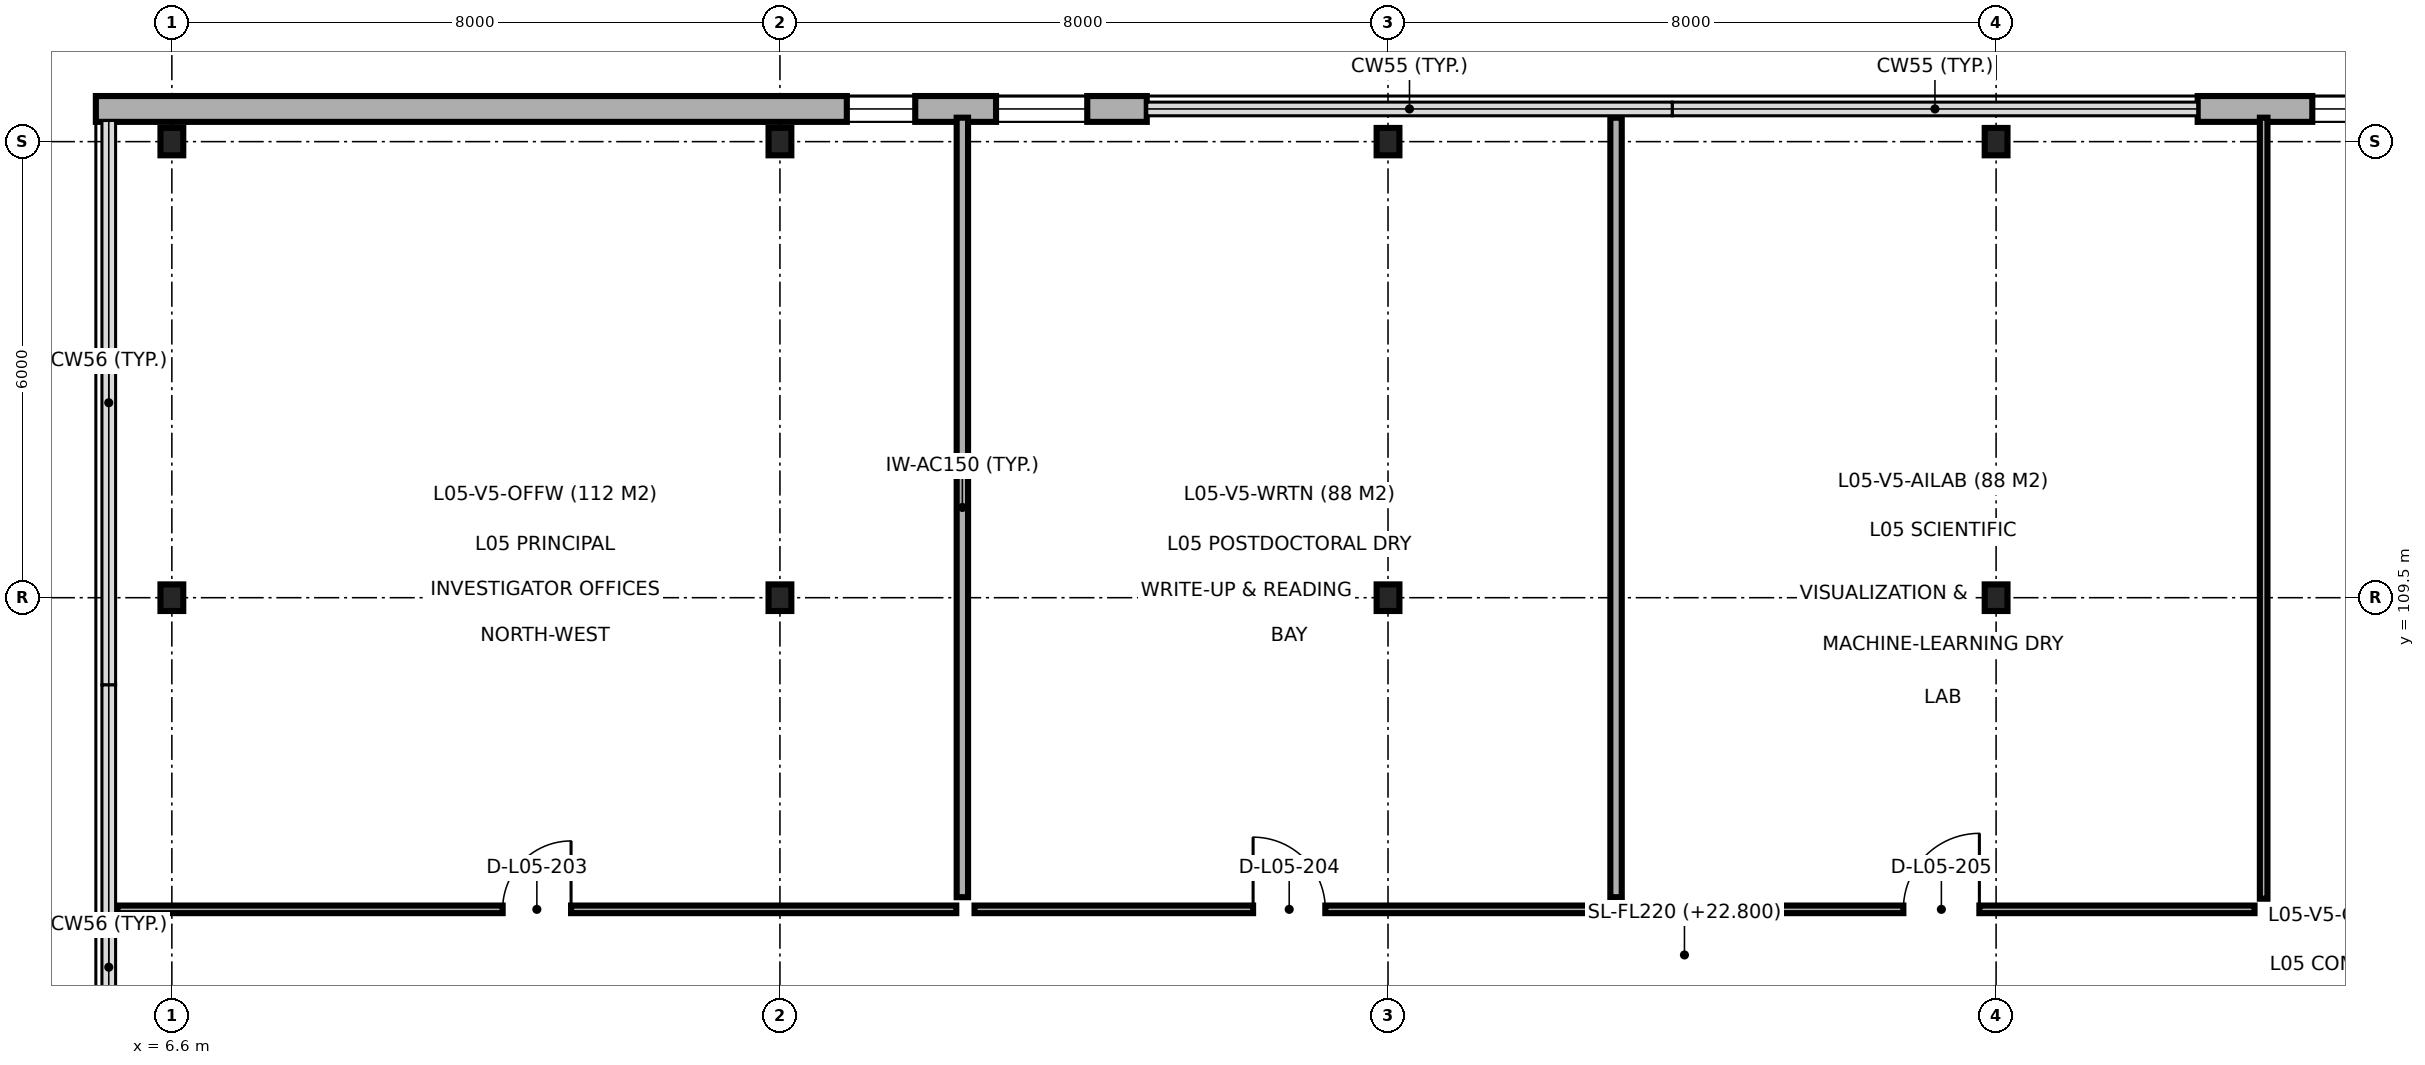
"""IFC4 building model, lengths in metres.
Left out: names, types, materials, properties, quantities, classifications, styles, units other than length and angle.
Written with IfcOpenShell. Run it as: python <this file> out.ifc"""

import sys

from ifc_helpers import new_model, si_unit, direction, frame, frame_2d, origin, origin_2d, place, context, subcontext, project, spatial, rectangle, i_section, extrude, element, fill, save


model = new_model("IFC4")
c1 = context("Model", 3, precision=1e-05, world=origin(), true_north=direction((0.0, 1.0)))
c2 = subcontext(c1, "Body", "Model", "MODEL_VIEW")
j1 = project(units=[si_unit("LENGTHUNIT", "METRE"), si_unit("PLANEANGLEUNIT", "RADIAN")], contexts=[c1])
p1 = place(None, origin())
s1 = spatial("IfcSite", under=j1, at=p1, CompositionType="ELEMENT")
p2 = place(p1, origin())
s2 = spatial("IfcBuilding", under=s1, at=p2, CompositionType="ELEMENT")
p3 = place(p2, frame((0.0, 0.0, 22.8)))
s3 = spatial("IfcBuildingStorey", under=s2, at=p3, CompositionType="ELEMENT", Elevation=22.8)
p4 = place(p3, frame((6.6, 109.5, 0.0), z_axis=(0.0, 0.0, 1.0), x_axis=(1.0, 0.0, 0.0)))
e1 = element("IfcColumn", 1, at=p4, inside=s3, PredefinedType="COLUMN", context=c2, shape_type="SweptSolid", body=[
    extrude(i_section(OverallWidth=0.3, OverallDepth=0.35, WebThickness=0.01, FlangeThickness=0.018, FilletRadius=0.027, at=origin_2d()), origin(), (0.0, 0.0, 1.0), 3.9),
])
p5 = place(p3, frame((6.6, 115.5, 0.0), z_axis=(0.0, 0.0, 1.0), x_axis=(1.0, 0.0, 0.0)))
e2 = element("IfcColumn", 2, at=p5, inside=s3, PredefinedType="COLUMN", context=c2, shape_type="SweptSolid", body=[
    extrude(i_section(OverallWidth=0.3, OverallDepth=0.36, WebThickness=0.012, FlangeThickness=0.022, FilletRadius=0.027, at=origin_2d()), origin(), (0.0, 0.0, 1.0), 3.9),
])
p6 = place(p3, frame((14.6, 109.5, 0.0), z_axis=(0.0, 0.0, 1.0), x_axis=(1.0, 0.0, 0.0)))
e3 = element("IfcColumn", 3, at=p6, inside=s3, PredefinedType="COLUMN", context=c2, shape_type="SweptSolid", body=[
    extrude(i_section(OverallWidth=0.3, OverallDepth=0.35, WebThickness=0.01, FlangeThickness=0.018, FilletRadius=0.027, at=origin_2d()), origin(), (0.0, 0.0, 1.0), 3.9),
])
p7 = place(p3, frame((14.6, 115.5, 0.0), z_axis=(0.0, 0.0, 1.0), x_axis=(1.0, 0.0, 0.0)))
e4 = element("IfcColumn", 4, at=p7, inside=s3, PredefinedType="COLUMN", context=c2, shape_type="SweptSolid", body=[
    extrude(i_section(OverallWidth=0.3, OverallDepth=0.36, WebThickness=0.012, FlangeThickness=0.022, FilletRadius=0.027, at=origin_2d()), origin(), (0.0, 0.0, 1.0), 3.9),
])
p8 = place(p3, frame((22.6, 109.5, 0.0), z_axis=(0.0, 0.0, 1.0), x_axis=(1.0, 0.0, 0.0)))
e5 = element("IfcColumn", 5, at=p8, inside=s3, PredefinedType="COLUMN", context=c2, shape_type="SweptSolid", body=[
    extrude(i_section(OverallWidth=0.3, OverallDepth=0.35, WebThickness=0.01, FlangeThickness=0.018, FilletRadius=0.027, at=origin_2d()), origin(), (0.0, 0.0, 1.0), 3.9),
])
p9 = place(p3, frame((22.6, 115.5, 0.0), z_axis=(0.0, 0.0, 1.0), x_axis=(1.0, 0.0, 0.0)))
e6 = element("IfcColumn", 6, at=p9, inside=s3, PredefinedType="COLUMN", context=c2, shape_type="SweptSolid", body=[
    extrude(i_section(OverallWidth=0.3, OverallDepth=0.36, WebThickness=0.012, FlangeThickness=0.022, FilletRadius=0.027, at=origin_2d()), origin(), (0.0, 0.0, 1.0), 3.9),
])
p10 = place(p3, frame((30.6, 109.5, 0.0), z_axis=(0.0, 0.0, 1.0), x_axis=(1.0, 0.0, 0.0)))
e7 = element("IfcColumn", 7, at=p10, inside=s3, PredefinedType="COLUMN", context=c2, shape_type="SweptSolid", body=[
    extrude(i_section(OverallWidth=0.3, OverallDepth=0.35, WebThickness=0.01, FlangeThickness=0.018, FilletRadius=0.027, at=origin_2d()), origin(), (0.0, 0.0, 1.0), 3.9),
])
p11 = place(p3, frame((30.6, 115.5, 0.0), z_axis=(0.0, 0.0, 1.0), x_axis=(1.0, 0.0, 0.0)))
e8 = element("IfcColumn", 8, at=p11, inside=s3, PredefinedType="COLUMN", context=c2, shape_type="SweptSolid", body=[
    extrude(i_section(OverallWidth=0.3, OverallDepth=0.36, WebThickness=0.012, FlangeThickness=0.022, FilletRadius=0.027, at=origin_2d()), origin(), (0.0, 0.0, 1.0), 3.9),
])
p12 = place(p3, frame((47.078, 115.93, 0.0), z_axis=(0.0, 0.0, 1.0), x_axis=(-1.0, 0.0, 0.0)))
e9 = element("IfcWall", 9, at=p12, inside=s3, PredefinedType="SOLIDWALL", context=c2, shape_type="SweptSolid", body=[
    extrude(rectangle(XDim=13.826, YDim=0.34, at=frame_2d((6.913, 0.0))), origin(), (0.0, 0.0, 1.0), 3.68),
])
p13 = place(p12, frame((9.158, 0.0, 0.9)))
e10 = element("IfcOpeningElement", 10, at=p13, cuts=e9, PredefinedType="OPENING", context=c2, shape_type="SweptSolid", body=[
    extrude(rectangle(XDim=0.9, YDim=1.8, at=frame_2d((0.45, 0.9))), frame((0.0, 0.18, 0.0), z_axis=(0.0, -1.0, 0.0), x_axis=(1.0, 0.0, 0.0)), (0.0, 0.0, 1.0), 0.36),
])
p14 = place(p12, frame((11.118, 0.0, 0.9)))
e11 = element("IfcOpeningElement", 11, at=p14, cuts=e9, PredefinedType="OPENING", context=c2, shape_type="SweptSolid", body=[
    extrude(rectangle(XDim=1.2, YDim=1.8, at=frame_2d((0.6, 0.9))), frame((0.0, 0.18, 0.0), z_axis=(0.0, -1.0, 0.0), x_axis=(1.0, 0.0, 0.0)), (0.0, 0.0, 1.0), 0.36),
])
p15 = place(p3, frame((19.426, 115.93, 0.0), z_axis=(0.0, 0.0, 1.0), x_axis=(-1.0, 0.0, 0.0)))
e12 = element("IfcWall", 12, at=p15, inside=s3, PredefinedType="SOLIDWALL", context=c2, shape_type="SweptSolid", body=[
    extrude(rectangle(XDim=13.826, YDim=0.34, at=frame_2d((6.913, 0.0))), origin(), (0.0, 0.0, 1.0), 3.68),
])
p16 = place(p15, frame((0.783, 0.0, 0.9)))
e13 = element("IfcOpeningElement", 13, at=p16, cuts=e12, PredefinedType="OPENING", context=c2, shape_type="SweptSolid", body=[
    extrude(rectangle(XDim=1.2, YDim=1.8, at=frame_2d((0.6, 0.9))), frame((0.0, 0.18, 0.0), z_axis=(0.0, -1.0, 0.0), x_axis=(1.0, 0.0, 0.0)), (0.0, 0.0, 1.0), 0.36),
])
p17 = place(p15, frame((3.046, 0.0, 0.9)))
e14 = element("IfcOpeningElement", 14, at=p17, cuts=e12, PredefinedType="OPENING", context=c2, shape_type="SweptSolid", body=[
    extrude(rectangle(XDim=0.9, YDim=1.8, at=frame_2d((0.45, 0.9))), frame((0.0, 0.18, 0.0), z_axis=(0.0, -1.0, 0.0), x_axis=(1.0, 0.0, 0.0)), (0.0, 0.0, 1.0), 0.36),
])
p18 = place(p3, frame((17.0, 105.56, 0.0), z_axis=(0.0, 0.0, 1.0), x_axis=(0.0, 1.0, 0.0)))
e15 = element("IfcWall", 15, at=p18, inside=s3, PredefinedType="PARTITIONING", context=c2, shape_type="SweptSolid", body=[
    extrude(rectangle(XDim=10.255, YDim=0.15, at=frame_2d((5.127, 0.0))), origin(), (0.0, 0.0, 1.0), 3.44),
])
p19 = place(p3, frame((25.6, 105.56, 0.0), z_axis=(0.0, 0.0, 1.0), x_axis=(0.0, 1.0, 0.0)))
e16 = element("IfcWall", 16, at=p19, inside=s3, PredefinedType="PARTITIONING", context=c2, shape_type="SweptSolid", body=[
    extrude(rectangle(XDim=10.255, YDim=0.15, at=frame_2d((5.127, 0.0))), origin(), (0.0, 0.0, 1.0), 3.38),
])
p20 = place(p3, frame((34.12, 105.54, 0.0), z_axis=(0.0, 0.0, 1.0), x_axis=(0.0, 1.0, 0.0)))
e17 = element("IfcWall", 17, at=p20, inside=s3, PredefinedType="PARTITIONING", context=c2, shape_type="SweptSolid", body=[
    extrude(rectangle(XDim=10.275, YDim=0.1, at=frame_2d((5.137, 0.0))), origin(), (0.0, 0.0, 1.0), 3.68),
])
p21 = place(p3, frame((5.885, 105.4, 0.0), z_axis=(0.0, 0.0, 1.0), x_axis=(1.0, 0.0, 0.0)))
e18 = element("IfcWall", 18, at=p21, inside=s3, PredefinedType="PARTITIONING", context=c2, shape_type="SweptSolid", body=[
    extrude(rectangle(XDim=11.035, YDim=0.1, at=frame_2d((5.518, 0.0))), origin(), (0.0, 0.0, 1.0), 3.68),
])
p22 = place(p21, frame((5.067, 0.0, 0.0)))
e19 = element("IfcOpeningElement", 19, at=p22, cuts=e18, PredefinedType="OPENING", context=c2, shape_type="SweptSolid", body=[
    extrude(rectangle(XDim=0.9, YDim=2.1, at=frame_2d((0.45, 1.05))), frame((0.0, 0.06, 0.0), z_axis=(0.0, -1.0, 0.0), x_axis=(1.0, 0.0, 0.0)), (0.0, 0.0, 1.0), 0.12),
])
p23 = place(p3, frame((17.16, 105.4, 0.0), z_axis=(0.0, 0.0, 1.0), x_axis=(1.0, 0.0, 0.0)))
e20 = element("IfcWall", 20, at=p23, inside=s3, PredefinedType="PARTITIONING", context=c2, shape_type="SweptSolid", body=[
    extrude(rectangle(XDim=8.28, YDim=0.1, at=frame_2d((4.14, 0.0))), origin(), (0.0, 0.0, 1.0), 3.68),
])
p24 = place(p23, frame((3.665, 0.0, 0.0)))
e21 = element("IfcOpeningElement", 21, at=p24, cuts=e20, PredefinedType="OPENING", context=c2, shape_type="SweptSolid", body=[
    extrude(rectangle(XDim=0.95, YDim=2.1, at=frame_2d((0.475, 1.05))), frame((0.0, 0.06, 0.0), z_axis=(0.0, -1.0, 0.0), x_axis=(1.0, 0.0, 0.0)), (0.0, 0.0, 1.0), 0.12),
])
p25 = place(p3, frame((25.76, 105.4, 0.0), z_axis=(0.0, 0.0, 1.0), x_axis=(1.0, 0.0, 0.0)))
e22 = element("IfcWall", 22, at=p25, inside=s3, PredefinedType="PARTITIONING", context=c2, shape_type="SweptSolid", body=[
    extrude(rectangle(XDim=8.24, YDim=0.1, at=frame_2d((4.12, 0.0))), origin(), (0.0, 0.0, 1.0), 3.68),
])
p26 = place(p25, frame((3.62, 0.0, 0.0)))
e23 = element("IfcOpeningElement", 23, at=p26, cuts=e22, PredefinedType="OPENING", context=c2, shape_type="SweptSolid", body=[
    extrude(rectangle(XDim=1.0, YDim=2.15, at=frame_2d((0.5, 1.075))), frame((0.0, 0.06, 0.0), z_axis=(0.0, -1.0, 0.0), x_axis=(1.0, 0.0, 0.0)), (0.0, 0.0, 1.0), 0.12),
])
p27 = place(p14, origin())
e24 = element("IfcWindow", 24, at=p27, inside=s3, PartitioningType="SINGLE_PANEL", PredefinedType="WINDOW", context=c2, shape_type="SweptSolid", body=[
    extrude(rectangle(XDim=1.2, YDim=1.8, at=frame_2d((0.6, 0.9))), frame((0.0, 0.03, 0.0), z_axis=(0.0, -1.0, 0.0), x_axis=(1.0, 0.0, 0.0)), (0.0, 0.0, 1.0), 0.06),
])
fill(e11, e24)
p28 = place(p16, origin())
e25 = element("IfcWindow", 25, at=p28, inside=s3, PartitioningType="SINGLE_PANEL", PredefinedType="WINDOW", context=c2, shape_type="SweptSolid", body=[
    extrude(rectangle(XDim=1.2, YDim=1.8, at=frame_2d((0.6, 0.9))), frame((0.0, 0.03, 0.0), z_axis=(0.0, -1.0, 0.0), x_axis=(1.0, 0.0, 0.0)), (0.0, 0.0, 1.0), 0.06),
])
fill(e13, e25)
p29 = place(p17, origin())
e26 = element("IfcWindow", 26, at=p29, inside=s3, PartitioningType="SINGLE_PANEL", PredefinedType="WINDOW", context=c2, shape_type="SweptSolid", body=[
    extrude(rectangle(XDim=0.9, YDim=1.8, at=frame_2d((0.45, 0.9))), frame((0.0, 0.03, 0.0), z_axis=(0.0, -1.0, 0.0), x_axis=(1.0, 0.0, 0.0)), (0.0, 0.0, 1.0), 0.06),
])
fill(e14, e26)
p30 = place(p22, origin())
e27 = element("IfcDoor", 27, at=p30, inside=s3, OperationType="SINGLE_SWING_RIGHT", PredefinedType="DOOR", context=c2, shape_type="SweptSolid", body=[
    extrude(rectangle(XDim=0.9, YDim=2.1, at=frame_2d((0.45, 1.05))), frame((0.0, 0.025, 0.0), z_axis=(0.0, -1.0, 0.0), x_axis=(1.0, 0.0, 0.0)), (0.0, 0.0, 1.0), 0.05),
])
fill(e19, e27)
p31 = place(p24, origin())
e28 = element("IfcDoor", 28, at=p31, inside=s3, OperationType="SINGLE_SWING_LEFT", PredefinedType="DOOR", context=c2, shape_type="SweptSolid", body=[
    extrude(rectangle(XDim=0.95, YDim=2.1, at=frame_2d((0.475, 1.05))), frame((0.0, 0.025, 0.0), z_axis=(0.0, -1.0, 0.0), x_axis=(1.0, 0.0, 0.0)), (0.0, 0.0, 1.0), 0.05),
])
fill(e21, e28)
p32 = place(p26, origin())
e29 = element("IfcDoor", 29, at=p32, inside=s3, OperationType="SINGLE_SWING_RIGHT", PredefinedType="DOOR", context=c2, shape_type="SweptSolid", body=[
    extrude(rectangle(XDim=1.0, YDim=2.15, at=frame_2d((0.5, 1.075))), frame((0.0, 0.025, 0.0), z_axis=(0.0, -1.0, 0.0), x_axis=(1.0, 0.0, 0.0)), (0.0, 0.0, 1.0), 0.05),
])
fill(e23, e29)
save(model, sys.argv[1])
